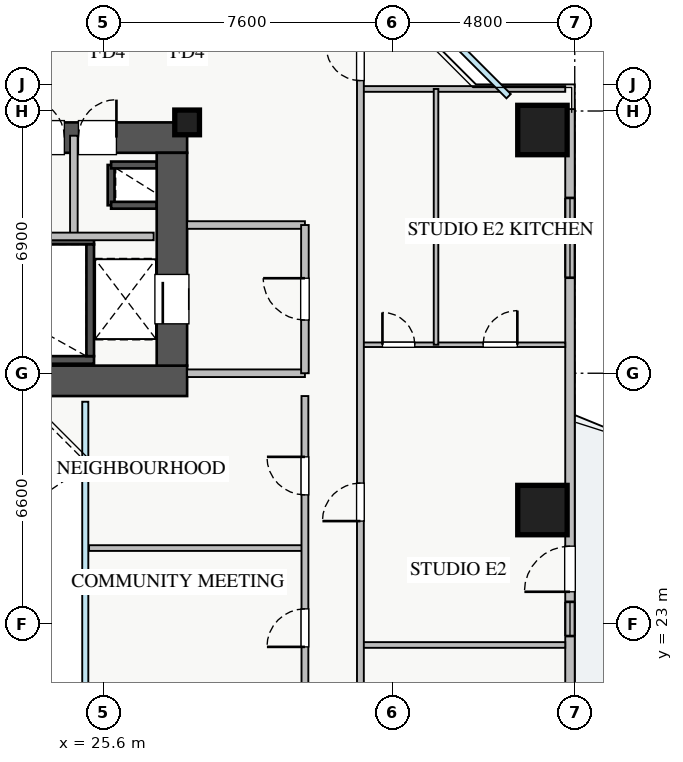
"""IFC4 building model, lengths in metres.
Left out: names, types, materials, properties, quantities, classifications, styles, units other than length and angle.
Written with IfcOpenShell. Run it as: python <this file> out.ifc"""

import sys

from ifc_helpers import new_model, si_unit, direction, frame, frame_2d, origin, origin_2d, place, context, subcontext, project, spatial, rectangle, extrude, source, transform, mapped, element, fill, save


model = new_model("IFC4")
c1 = context("Model", 3, precision=1e-05, world=origin(), true_north=direction((0.0, 1.0)))
c2 = subcontext(c1, "Body", "Model", "MODEL_VIEW")
j1 = project(units=[si_unit("LENGTHUNIT", "METRE"), si_unit("PLANEANGLEUNIT", "RADIAN")], contexts=[c1])
p1 = place(None, origin())
s1 = spatial("IfcSite", under=j1, at=p1, CompositionType="ELEMENT")
p2 = place(p1, origin())
s2 = spatial("IfcBuilding", under=s1, at=p2, CompositionType="ELEMENT")
p3 = place(p2, frame((0.0, 0.0, 60.0)))
s3 = spatial("IfcBuildingStorey", under=s2, at=p3, CompositionType="ELEMENT", Elevation=60.0)
p4 = place(p3, frame((25.8, 34.02, 0.0), z_axis=(0.0, 0.0, 1.0), x_axis=(0.0, 1.0, 0.0)))
e1 = element("IfcWall", 1, at=p4, inside=s3, PredefinedType="SHEAR", context=c2, shape_type="SweptSolid", body=[
    extrude(rectangle(XDim=1.06, YDim=0.18, at=frame_2d((0.53, 0.0))), origin(), (0.0, 0.0, 1.0), 3.07),
])
for number, where, z_axis, x_axis in (
    (2, (25.8, 35.08, 0.0), (0.0, 0.0, 1.0), (1.0, 0.0, 0.0)),
    (3, (25.8, 34.02, 0.0), (0.0, 0.0, 1.0), (1.0, 0.0, 0.0)),
):
    element("IfcWall", number, at=place(p3, frame(where, z_axis=z_axis, x_axis=x_axis)), inside=s3, PredefinedType="SHEAR", context=c2, shape_type="SweptSolid", body=[
        extrude(rectangle(XDim=1.2, YDim=0.18, at=frame_2d((0.6, 0.0))), origin(), (0.0, 0.0, 1.0), 3.07),
    ])
p5 = place(p3, frame((18.2, 29.95, 0.0), z_axis=(0.0, 0.0, 1.0), x_axis=(1.0, 0.0, 0.0)))
e4 = element("IfcWall", 4, at=p5, inside=s3, PredefinedType="SHEAR", context=c2, shape_type="SweptSolid", body=[
    extrude(rectangle(XDim=7.15, YDim=0.2, at=frame_2d((3.575, 0.0))), origin(), (0.0, 0.0, 1.0), 3.25),
])
p6 = place(p3, frame((18.2, 33.09, 0.0), z_axis=(0.0, 0.0, 1.0), x_axis=(1.0, 0.0, 0.0)))
e5 = element("IfcWall", 5, at=p6, inside=s3, PredefinedType="SHEAR", context=c2, shape_type="SweptSolid", body=[
    extrude(rectangle(XDim=7.15, YDim=0.2, at=frame_2d((3.575, 0.0))), origin(), (0.0, 0.0, 1.0), 3.25),
])
p7 = place(p6, frame((0.35, 0.0, 0.0)))
e6 = element("IfcOpeningElement", 6, at=p7, cuts=e5, PredefinedType="OPENING", context=c2, shape_type="SweptSolid", body=[
    extrude(rectangle(XDim=1.1, YDim=2.05, at=frame_2d((0.55, 1.025))), frame((0.0, 0.11, 0.0), z_axis=(0.0, -1.0, 0.0), x_axis=(1.0, 0.0, 0.0)), (0.0, 0.0, 1.0), 0.22),
])
p8 = place(p3, frame((25.25, 30.05, 0.0), z_axis=(0.0, 0.0, 1.0), x_axis=(0.0, 1.0, 0.0)))
e7 = element("IfcWall", 7, at=p8, inside=s3, PredefinedType="SHEAR", context=c2, shape_type="SweptSolid", body=[
    extrude(rectangle(XDim=2.94, YDim=0.2, at=frame_2d((1.47, 0.0))), origin(), (0.0, 0.0, 1.0), 3.25),
])
p9 = place(p3, frame((10.2, 29.4, 0.0), z_axis=(0.0, 0.0, 1.0), x_axis=(1.0, 0.0, 0.0)))
e8 = element("IfcWall", 8, at=p9, inside=s3, PredefinedType="SHEAR", context=c2, shape_type="SweptSolid", body=[
    extrude(rectangle(XDim=17.6, YDim=0.8, at=frame_2d((8.8, 0.0))), origin(), (0.0, 0.0, 1.0), 3.25),
])
p10 = place(p3, frame((10.2, 35.8, 0.0), z_axis=(0.0, 0.0, 1.0), x_axis=(1.0, 0.0, 0.0)))
e9 = element("IfcWall", 9, at=p10, inside=s3, PredefinedType="SHEAR", context=c2, shape_type="SweptSolid", body=[
    extrude(rectangle(XDim=17.6, YDim=0.8, at=frame_2d((8.8, 0.0))), origin(), (0.0, 0.0, 1.0), 3.25),
])
p11 = place(p10, frame((1.15, 0.0, 0.0)))
e10 = element("IfcOpeningElement", 10, at=p11, cuts=e9, PredefinedType="OPENING", context=c2, shape_type="SweptSolid", body=[
    extrude(rectangle(XDim=1.1, YDim=2.05, at=frame_2d((0.55, 1.025))), frame((0.0, 0.41, 0.0), z_axis=(0.0, -1.0, 0.0), x_axis=(1.0, 0.0, 0.0)), (0.0, 0.0, 1.0), 0.82),
])
p12 = place(p10, frame((8.3, 0.0, 0.0)))
e11 = element("IfcOpeningElement", 11, at=p12, cuts=e9, PredefinedType="OPENING", context=c2, shape_type="SweptSolid", body=[
    extrude(rectangle(XDim=1.1, YDim=2.05, at=frame_2d((0.55, 1.025))), frame((0.0, 0.41, 0.0), z_axis=(0.0, -1.0, 0.0), x_axis=(1.0, 0.0, 0.0)), (0.0, 0.0, 1.0), 0.82),
])
p13 = place(p10, frame((10.05, 0.0, 0.0)))
e12 = element("IfcOpeningElement", 12, at=p13, cuts=e9, PredefinedType="OPENING", context=c2, shape_type="SweptSolid", body=[
    extrude(rectangle(XDim=1.1, YDim=2.05, at=frame_2d((0.55, 1.025))), frame((0.0, 0.41, 0.0), z_axis=(0.0, -1.0, 0.0), x_axis=(1.0, 0.0, 0.0)), (0.0, 0.0, 1.0), 0.82),
])
p14 = place(p10, frame((14.74, 0.0, 0.0)))
e13 = element("IfcOpeningElement", 13, at=p14, cuts=e9, PredefinedType="OPENING", context=c2, shape_type="SweptSolid", body=[
    extrude(rectangle(XDim=1.0, YDim=2.05, at=frame_2d((0.5, 1.025))), frame((0.0, 0.41, 0.0), z_axis=(0.0, -1.0, 0.0), x_axis=(1.0, 0.0, 0.0)), (0.0, 0.0, 1.0), 0.82),
])
p15 = place(p10, frame((11.835, 0.0, 0.0)))
e14 = element("IfcOpeningElement", 14, at=p15, cuts=e9, PredefinedType="OPENING", context=c2, shape_type="SweptSolid", body=[
    extrude(rectangle(XDim=1.0, YDim=2.05, at=frame_2d((0.5, 1.025))), frame((0.0, 0.41, 0.0), z_axis=(0.0, -1.0, 0.0), x_axis=(1.0, 0.0, 0.0)), (0.0, 0.0, 1.0), 0.82),
])
p16 = place(p10, frame((13.37, 0.0, 0.0)))
e15 = element("IfcOpeningElement", 15, at=p16, cuts=e9, PredefinedType="OPENING", context=c2, shape_type="SweptSolid", body=[
    extrude(rectangle(XDim=1.0, YDim=2.05, at=frame_2d((0.5, 1.025))), frame((0.0, 0.41, 0.0), z_axis=(0.0, -1.0, 0.0), x_axis=(1.0, 0.0, 0.0)), (0.0, 0.0, 1.0), 0.82),
])
p17 = place(p3, frame((27.4, 29.8, 0.0), z_axis=(0.0, 0.0, 1.0), x_axis=(0.0, 1.0, 0.0)))
e16 = element("IfcWall", 16, at=p17, inside=s3, PredefinedType="SHEAR", context=c2, shape_type="SweptSolid", body=[
    extrude(rectangle(XDim=5.6, YDim=0.8, at=frame_2d((2.8, 0.0))), origin(), (0.0, 0.0, 1.0), 3.25),
])
p18 = place(p17, frame((1.1, 0.0, 0.0)))
e17 = element("IfcOpeningElement", 17, at=p18, cuts=e16, PredefinedType="OPENING", context=c2, shape_type="SweptSolid", body=[
    extrude(rectangle(XDim=1.3, YDim=2.05, at=frame_2d((0.65, 1.025))), frame((0.0, 0.41, 0.0), z_axis=(0.0, -1.0, 0.0), x_axis=(1.0, 0.0, 0.0)), (0.0, 0.0, 1.0), 0.82),
])
m1 = source(origin(), c2, "Body", "SweptSolid", [
    extrude(rectangle(XDim=0.65, YDim=0.65, at=origin_2d()), origin(), (0.0, 0.0, 1.0), 3.25),
])
p19 = place(p3, frame((27.8, 36.2, 0.0), z_axis=(0.0, 0.0, 1.0), x_axis=(1.0, 0.0, 0.0)))
e18 = element("IfcColumn", 18, at=p19, inside=s3, PredefinedType="PILASTER", context=c2, shape_type="MappedRepresentation", body=[
    mapped(m1, transform((0.0, 0.0, 0.0), x_axis=(1.0, 0.0, 0.0), y_axis=(0.0, 1.0, 0.0), z_axis=(0.0, 0.0, 1.0), scale=1.0)),
])
m2 = source(origin(), c2, "Body", "SweptSolid", [
    extrude(rectangle(XDim=1.3, YDim=1.3, at=origin_2d()), origin(), (0.0, 0.0, 1.0), 3.25),
])
for number, where, z_axis, x_axis in (
    (19, (37.15, 26.0, 0.0), (0.0, 0.0, 1.0), (1.0, 0.0, 0.0)),
    (20, (37.15, 36.0, 0.0), (0.0, 0.0, 1.0), (1.0, 0.0, 0.0)),
):
    element("IfcColumn", number, at=place(p3, frame(where, z_axis=z_axis, x_axis=x_axis)), inside=s3, PredefinedType="COLUMN", context=c2, shape_type="MappedRepresentation", body=[
        mapped(m2, transform((0.0, 0.0, 0.0), x_axis=(1.0, 0.0, 0.0), y_axis=(0.0, 1.0, 0.0), z_axis=(0.0, 0.0, 1.0), scale=1.0)),
    ])
p20 = place(p3, frame((37.875, 9.45, 0.0), z_axis=(0.0, 0.0, 1.0), x_axis=(0.0, 1.0, 0.0)))
e21 = element("IfcWall", 21, at=p20, inside=s3, PredefinedType="STANDARD", context=c2, shape_type="SweptSolid", body=[
    extrude(rectangle(XDim=27.1, YDim=0.25, at=frame_2d((13.55, 0.0))), origin(), (0.0, 0.0, 1.0), 2.61),
])
p21 = place(p20, frame((14.4, 0.0, 0.0)))
e22 = element("IfcOpeningElement", 22, at=p21, cuts=e21, PredefinedType="OPENING", context=c2, shape_type="SweptSolid", body=[
    extrude(rectangle(XDim=1.2, YDim=2.1, at=frame_2d((0.6, 1.05))), frame((0.0, 0.135, 0.0), z_axis=(0.0, -1.0, 0.0), x_axis=(1.0, 0.0, 0.0)), (0.0, 0.0, 1.0), 0.27),
])
p22 = place(p20, frame((2.188, 0.0, 0.9)))
e23 = element("IfcOpeningElement", 23, at=p22, cuts=e21, PredefinedType="OPENING", context=c2, shape_type="SweptSolid", body=[
    extrude(rectangle(XDim=2.4, YDim=1.48, at=frame_2d((1.2, 0.74))), frame((0.0, 0.135, 0.0), z_axis=(0.0, -1.0, 0.0), x_axis=(1.0, 0.0, 0.0)), (0.0, 0.0, 1.0), 0.27),
])
p23 = place(p20, frame((22.663, 0.0, 0.9)))
e24 = element("IfcOpeningElement", 24, at=p23, cuts=e21, PredefinedType="OPENING", context=c2, shape_type="SweptSolid", body=[
    extrude(rectangle(XDim=2.1, YDim=1.48, at=frame_2d((1.05, 0.74))), frame((0.0, 0.135, 0.0), z_axis=(0.0, -1.0, 0.0), x_axis=(1.0, 0.0, 0.0)), (0.0, 0.0, 1.0), 0.27),
])
p24 = place(p20, frame((13.235, 0.0, 0.9)))
e25 = element("IfcOpeningElement", 25, at=p24, cuts=e21, PredefinedType="OPENING", context=c2, shape_type="SweptSolid", body=[
    extrude(rectangle(XDim=0.9, YDim=1.2, at=frame_2d((0.45, 0.6))), frame((0.0, 0.135, 0.0), z_axis=(0.0, -1.0, 0.0), x_axis=(1.0, 0.0, 0.0)), (0.0, 0.0, 1.0), 0.27),
])
for number, where, z_axis, x_axis in (
    (26, (27.8, 29.6, 0.0), (0.0, 0.0, 1.0), (1.0, 0.0, 0.0)),
    (27, (27.8, 33.5, 0.0), (0.0, 0.0, 1.0), (1.0, 0.0, 0.0)),
):
    element("IfcWall", number, at=place(p3, frame(where, z_axis=z_axis, x_axis=x_axis)), inside=s3, PredefinedType="PARTITIONING", context=c2, shape_type="SweptSolid", body=[
        extrude(rectangle(XDim=3.1, YDim=0.2, at=frame_2d((1.55, 0.0))), origin(), (0.0, 0.0, 1.0), 3.07),
    ])
p25 = place(p3, frame((30.9, 29.6, 0.0), z_axis=(0.0, 0.0, 1.0), x_axis=(0.0, 1.0, 0.0)))
e28 = element("IfcWall", 28, at=p25, inside=s3, PredefinedType="PARTITIONING", context=c2, shape_type="SweptSolid", body=[
    extrude(rectangle(XDim=3.9, YDim=0.2, at=frame_2d((1.95, 0.0))), origin(), (0.0, 0.0, 1.0), 3.07),
])
p26 = place(p25, frame((1.4, 0.0, 0.0)))
e29 = element("IfcOpeningElement", 29, at=p26, cuts=e28, PredefinedType="OPENING", context=c2, shape_type="SweptSolid", body=[
    extrude(rectangle(XDim=1.1, YDim=2.05, at=frame_2d((0.55, 1.025))), frame((0.0, 0.11, 0.0), z_axis=(0.0, -1.0, 0.0), x_axis=(1.0, 0.0, 0.0)), (0.0, 0.0, 1.0), 0.22),
])
p27 = place(p3, frame((24.82, 33.2, 0.0), z_axis=(0.0, 0.0, 1.0), x_axis=(0.0, 1.0, 0.0)))
e30 = element("IfcWall", 30, at=p27, inside=s3, PredefinedType="PARTITIONING", context=c2, shape_type="SweptSolid", body=[
    extrude(rectangle(XDim=2.65, YDim=0.2, at=frame_2d((1.325, 0.0))), origin(), (0.0, 0.0, 1.0), 3.07),
])
p28 = place(p3, frame((21.75, 33.2, 0.0), z_axis=(0.0, 0.0, 1.0), x_axis=(1.0, 0.0, 0.0)))
e31 = element("IfcWall", 31, at=p28, inside=s3, PredefinedType="PARTITIONING", context=c2, shape_type="SweptSolid", body=[
    extrude(rectangle(XDim=5.17, YDim=0.2, at=frame_2d((2.585, 0.0))), origin(), (0.0, 0.0, 1.0), 3.07),
])
p29 = place(p3, frame((32.36, 37.08, 0.0), z_axis=(0.0, 0.0, 1.0), x_axis=(1.0, 0.0, 0.0)))
e32 = element("IfcWall", 32, at=p29, inside=s3, PredefinedType="PARTITIONING", context=c2, shape_type="SweptSolid", body=[
    extrude(rectangle(XDim=5.39, YDim=0.15, at=frame_2d((2.695, 0.0))), origin(), (0.0, 0.0, 1.0), 3.07),
])
p30 = place(p3, frame((32.36, 30.35, 0.0), z_axis=(0.0, 0.0, 1.0), x_axis=(1.0, 0.0, 0.0)))
e33 = element("IfcWall", 33, at=p30, inside=s3, PredefinedType="PLUMBINGWALL", context=c2, shape_type="SweptSolid", body=[
    extrude(rectangle(XDim=5.39, YDim=0.12, at=frame_2d((2.695, 0.0))), origin(), (0.0, 0.0, 1.0), 3.07),
])
p31 = place(p30, frame((0.58, 0.0, 0.0)))
e34 = element("IfcOpeningElement", 34, at=p31, cuts=e33, PredefinedType="OPENING", context=c2, shape_type="SweptSolid", body=[
    extrude(rectangle(XDim=0.85, YDim=2.05, at=frame_2d((0.425, 1.025))), frame((0.0, 0.07, 0.0), z_axis=(0.0, -1.0, 0.0), x_axis=(1.0, 0.0, 0.0)), (0.0, 0.0, 1.0), 0.14),
])
p32 = place(p30, frame((3.23, 0.0, 0.0)))
e35 = element("IfcOpeningElement", 35, at=p32, cuts=e33, PredefinedType="OPENING", context=c2, shape_type="SweptSolid", body=[
    extrude(rectangle(XDim=0.9, YDim=2.05, at=frame_2d((0.45, 1.025))), frame((0.0, 0.07, 0.0), z_axis=(0.0, -1.0, 0.0), x_axis=(1.0, 0.0, 0.0)), (0.0, 0.0, 1.0), 0.14),
])
p33 = place(p3, frame((34.35, 30.35, 0.0), z_axis=(0.0, 0.0, 1.0), x_axis=(0.0, 1.0, 0.0)))
e36 = element("IfcWall", 36, at=p33, inside=s3, PredefinedType="PLUMBINGWALL", context=c2, shape_type="SweptSolid", body=[
    extrude(rectangle(XDim=6.73, YDim=0.12, at=frame_2d((3.365, 0.0))), origin(), (0.0, 0.0, 1.0), 3.07),
])
p34 = place(p3, frame((32.36, 22.45, 0.0), z_axis=(0.0, 0.0, 1.0), x_axis=(1.0, 0.0, 0.0)))
e37 = element("IfcWall", 37, at=p34, inside=s3, PredefinedType="PARTITIONING", context=c2, shape_type="SweptSolid", body=[
    extrude(rectangle(XDim=5.39, YDim=0.15, at=frame_2d((2.695, 0.0))), origin(), (0.0, 0.0, 1.0), 3.07),
])
p35 = place(p3, frame((32.36, 7.21, 0.0), z_axis=(0.0, 0.0, 1.0), x_axis=(0.0, 1.0, 0.0)))
e38 = element("IfcWall", 38, at=p35, inside=s3, PredefinedType="PARTITIONING", context=c2, shape_type="SweptSolid", body=[
    extrude(rectangle(XDim=31.23, YDim=0.18, at=frame_2d((15.615, 0.0))), origin(), (0.0, 0.0, 1.0), 2.821),
])
p36 = place(p35, frame((30.09, 0.0, 0.0)))
e39 = element("IfcOpeningElement", 39, at=p36, cuts=e38, PredefinedType="OPENING", context=c2, shape_type="SweptSolid", body=[
    extrude(rectangle(XDim=0.9, YDim=2.05, at=frame_2d((0.45, 1.025))), frame((0.0, 0.1, 0.0), z_axis=(0.0, -1.0, 0.0), x_axis=(1.0, 0.0, 0.0)), (0.0, 0.0, 1.0), 0.2),
])
p37 = place(p35, frame((0.415, 0.0, 0.0)))
e40 = element("IfcOpeningElement", 40, at=p37, cuts=e38, PredefinedType="OPENING", context=c2, shape_type="SweptSolid", body=[
    extrude(rectangle(XDim=0.9, YDim=2.05, at=frame_2d((0.45, 1.025))), frame((0.0, 0.1, 0.0), z_axis=(0.0, -1.0, 0.0), x_axis=(1.0, 0.0, 0.0)), (0.0, 0.0, 1.0), 0.2),
])
p38 = place(p35, frame((7.975, 0.0, 0.0)))
e41 = element("IfcOpeningElement", 41, at=p38, cuts=e38, PredefinedType="OPENING", context=c2, shape_type="SweptSolid", body=[
    extrude(rectangle(XDim=1.0, YDim=2.05, at=frame_2d((0.5, 1.025))), frame((0.0, 0.1, 0.0), z_axis=(0.0, -1.0, 0.0), x_axis=(1.0, 0.0, 0.0)), (0.0, 0.0, 1.0), 0.2),
])
p39 = place(p35, frame((18.5, 0.0, 0.0)))
e42 = element("IfcOpeningElement", 42, at=p39, cuts=e38, PredefinedType="OPENING", context=c2, shape_type="SweptSolid", body=[
    extrude(rectangle(XDim=1.0, YDim=2.05, at=frame_2d((0.5, 1.025))), frame((0.0, 0.1, 0.0), z_axis=(0.0, -1.0, 0.0), x_axis=(1.0, 0.0, 0.0)), (0.0, 0.0, 1.0), 0.2),
])
p40 = place(p3, frame((25.22, 25.0, 0.0), z_axis=(0.0, 0.0, 1.0), x_axis=(1.0, 0.0, 0.0)))
e43 = element("IfcWall", 43, at=p40, inside=s3, PredefinedType="PARTITIONING", context=c2, shape_type="SweptSolid", body=[
    extrude(rectangle(XDim=5.68, YDim=0.15, at=frame_2d((2.84, 0.0))), origin(), (0.0, 0.0, 1.0), 3.07),
])
p41 = place(p3, frame((30.9, 17.0, 0.0), z_axis=(0.0, 0.0, 1.0), x_axis=(0.0, 1.0, 0.0)))
e44 = element("IfcWall", 44, at=p41, inside=s3, PredefinedType="PARTITIONING", context=c2, shape_type="SweptSolid", body=[
    extrude(rectangle(XDim=12.0, YDim=0.18, at=frame_2d((6.0, 0.0))), origin(), (0.0, 0.0, 1.0), 3.07),
])
p42 = place(p41, frame((1.4, 0.0, 0.0)))
e45 = element("IfcOpeningElement", 45, at=p42, cuts=e44, PredefinedType="OPENING", context=c2, shape_type="SweptSolid", body=[
    extrude(rectangle(XDim=1.0, YDim=2.05, at=frame_2d((0.5, 1.025))), frame((0.0, 0.1, 0.0), z_axis=(0.0, -1.0, 0.0), x_axis=(1.0, 0.0, 0.0)), (0.0, 0.0, 1.0), 0.2),
])
p43 = place(p41, frame((5.4, 0.0, 0.0)))
e46 = element("IfcOpeningElement", 46, at=p43, cuts=e44, PredefinedType="OPENING", context=c2, shape_type="SweptSolid", body=[
    extrude(rectangle(XDim=1.0, YDim=2.05, at=frame_2d((0.5, 1.025))), frame((0.0, 0.1, 0.0), z_axis=(0.0, -1.0, 0.0), x_axis=(1.0, 0.0, 0.0)), (0.0, 0.0, 1.0), 0.2),
])
p44 = place(p41, frame((9.4, 0.0, 0.0)))
e47 = element("IfcOpeningElement", 47, at=p44, cuts=e44, PredefinedType="OPENING", context=c2, shape_type="SweptSolid", body=[
    extrude(rectangle(XDim=1.0, YDim=2.05, at=frame_2d((0.5, 1.025))), frame((0.0, 0.1, 0.0), z_axis=(0.0, -1.0, 0.0), x_axis=(1.0, 0.0, 0.0)), (0.0, 0.0, 1.0), 0.2),
])
m3 = source(origin(), c2, "Body", "SweptSolid", [
    extrude(rectangle(XDim=1.2, YDim=2.1, at=frame_2d((0.6, 1.05))), frame((0.0, 0.025, 0.0), z_axis=(0.0, -1.0, 0.0), x_axis=(1.0, 0.0, 0.0)), (0.0, 0.0, 1.0), 0.05),
])
p45 = place(p21, origin())
e48 = element("IfcDoor", 48, at=p45, inside=s3, OperationType="SINGLE_SWING_LEFT", PredefinedType="DOOR", context=c2, shape_type="MappedRepresentation", body=[
    mapped(m3, transform((0.0, 0.0, 0.0), x_axis=(1.0, 0.0, 0.0), y_axis=(0.0, 1.0, 0.0), z_axis=(0.0, 0.0, 1.0), scale=1.0)),
])
fill(e22, e48)
m4 = source(origin(), c2, "Body", "SweptSolid", [
    extrude(rectangle(XDim=2.1, YDim=1.48, at=frame_2d((1.05, 0.74))), frame((0.0, 0.03, 0.0), z_axis=(0.0, -1.0, 0.0), x_axis=(1.0, 0.0, 0.0)), (0.0, 0.0, 1.0), 0.06),
])
p46 = place(p23, origin())
e49 = element("IfcWindow", 49, at=p46, inside=s3, PartitioningType="TRIPLE_PANEL_VERTICAL", PredefinedType="WINDOW", context=c2, shape_type="MappedRepresentation", body=[
    mapped(m4, transform((0.0, 0.0, 0.0), x_axis=(1.0, 0.0, 0.0), y_axis=(0.0, 1.0, 0.0), z_axis=(0.0, 0.0, 1.0), scale=1.0)),
])
fill(e24, e49)
m5 = source(origin(), c2, "Body", "SweptSolid", [
    extrude(rectangle(XDim=1.3, YDim=2.05, at=frame_2d((0.65, 1.025))), frame((0.0, 0.025, 0.0), z_axis=(0.0, -1.0, 0.0), x_axis=(1.0, 0.0, 0.0)), (0.0, 0.0, 1.0), 0.05),
])
p47 = place(p18, origin())
e50 = element("IfcDoor", 50, at=p47, inside=s3, OperationType="SLIDING_TO_LEFT", PredefinedType="DOOR", context=c2, shape_type="MappedRepresentation", body=[
    mapped(m5, transform((0.0, 0.0, 0.0), x_axis=(1.0, 0.0, 0.0), y_axis=(0.0, 1.0, 0.0), z_axis=(0.0, 0.0, 1.0), scale=1.0)),
])
fill(e17, e50)
m6 = source(origin(), c2, "Body", "SweptSolid", [
    extrude(rectangle(XDim=1.0, YDim=2.05, at=frame_2d((0.5, 1.025))), frame((0.0, 0.025, 0.0), z_axis=(0.0, -1.0, 0.0), x_axis=(1.0, 0.0, 0.0)), (0.0, 0.0, 1.0), 0.05),
])
p48 = place(p14, origin())
e51 = element("IfcDoor", 51, at=p48, inside=s3, OperationType="SINGLE_SWING_RIGHT", PredefinedType="DOOR", context=c2, shape_type="MappedRepresentation", body=[
    mapped(m6, transform((0.0, 0.0, 0.0), x_axis=(1.0, 0.0, 0.0), y_axis=(0.0, 1.0, 0.0), z_axis=(0.0, 0.0, 1.0), scale=1.0)),
])
fill(e13, e51)
p49 = place(p16, origin())
e52 = element("IfcDoor", 52, at=p49, inside=s3, OperationType="SINGLE_SWING_LEFT", PredefinedType="DOOR", context=c2, shape_type="MappedRepresentation", body=[
    mapped(m6, transform((0.0, 0.0, 0.0), x_axis=(1.0, 0.0, 0.0), y_axis=(0.0, 1.0, 0.0), z_axis=(0.0, 0.0, 1.0), scale=1.0)),
])
fill(e15, e52)
m7 = source(origin(), c2, "Body", "SweptSolid", [
    extrude(rectangle(XDim=1.1, YDim=2.05, at=frame_2d((0.55, 1.025))), frame((0.0, 0.025, 0.0), z_axis=(0.0, -1.0, 0.0), x_axis=(1.0, 0.0, 0.0)), (0.0, 0.0, 1.0), 0.05),
])
p50 = place(p26, origin())
e53 = element("IfcDoor", 53, at=p50, inside=s3, OperationType="SINGLE_SWING_RIGHT", PredefinedType="DOOR", context=c2, shape_type="MappedRepresentation", body=[
    mapped(m7, transform((0.0, 0.0, 0.0), x_axis=(1.0, 0.0, 0.0), y_axis=(0.0, 1.0, 0.0), z_axis=(0.0, 0.0, 1.0), scale=1.0)),
])
fill(e29, e53)
m8 = source(origin(), c2, "Body", "SweptSolid", [
    extrude(rectangle(XDim=0.85, YDim=2.05, at=frame_2d((0.425, 1.025))), frame((0.0, 0.025, 0.0), z_axis=(0.0, -1.0, 0.0), x_axis=(1.0, 0.0, 0.0)), (0.0, 0.0, 1.0), 0.05),
])
p51 = place(p31, origin())
e54 = element("IfcDoor", 54, at=p51, inside=s3, OperationType="SINGLE_SWING_LEFT", PredefinedType="DOOR", context=c2, shape_type="MappedRepresentation", body=[
    mapped(m8, transform((0.0, 0.0, 0.0), x_axis=(1.0, 0.0, 0.0), y_axis=(0.0, 1.0, 0.0), z_axis=(0.0, 0.0, 1.0), scale=1.0)),
])
fill(e34, e54)
m9 = source(origin(), c2, "Body", "SweptSolid", [
    extrude(rectangle(XDim=0.9, YDim=2.05, at=frame_2d((0.45, 1.025))), frame((0.0, 0.025, 0.0), z_axis=(0.0, -1.0, 0.0), x_axis=(1.0, 0.0, 0.0)), (0.0, 0.0, 1.0), 0.05),
])
p52 = place(p32, origin())
e55 = element("IfcDoor", 55, at=p52, inside=s3, OperationType="SINGLE_SWING_RIGHT", PredefinedType="DOOR", context=c2, shape_type="MappedRepresentation", body=[
    mapped(m9, transform((0.0, 0.0, 0.0), x_axis=(1.0, 0.0, 0.0), y_axis=(0.0, 1.0, 0.0), z_axis=(0.0, 0.0, 1.0), scale=1.0)),
])
fill(e35, e55)
p53 = place(p36, origin())
e56 = element("IfcDoor", 56, at=p53, inside=s3, OperationType="SINGLE_SWING_RIGHT", PredefinedType="DOOR", context=c2, shape_type="MappedRepresentation", body=[
    mapped(m9, transform((0.0, 0.0, 0.0), x_axis=(1.0, 0.0, 0.0), y_axis=(0.0, 1.0, 0.0), z_axis=(0.0, 0.0, 1.0), scale=1.0)),
])
fill(e39, e56)
p54 = place(p39, origin())
e57 = element("IfcDoor", 57, at=p54, inside=s3, OperationType="SINGLE_SWING_LEFT", PredefinedType="DOOR", context=c2, shape_type="MappedRepresentation", body=[
    mapped(m6, transform((0.0, 0.0, 0.0), x_axis=(1.0, 0.0, 0.0), y_axis=(0.0, 1.0, 0.0), z_axis=(0.0, 0.0, 1.0), scale=1.0)),
])
fill(e42, e57)
p55 = place(p43, origin())
e58 = element("IfcDoor", 58, at=p55, inside=s3, OperationType="SINGLE_SWING_LEFT", PredefinedType="DOOR", context=c2, shape_type="MappedRepresentation", body=[
    mapped(m6, transform((0.0, 0.0, 0.0), x_axis=(1.0, 0.0, 0.0), y_axis=(0.0, 1.0, 0.0), z_axis=(0.0, 0.0, 1.0), scale=1.0)),
])
fill(e46, e58)
p56 = place(p44, origin())
e59 = element("IfcDoor", 59, at=p56, inside=s3, OperationType="SINGLE_SWING_RIGHT", PredefinedType="DOOR", context=c2, shape_type="MappedRepresentation", body=[
    mapped(m6, transform((0.0, 0.0, 0.0), x_axis=(1.0, 0.0, 0.0), y_axis=(0.0, 1.0, 0.0), z_axis=(0.0, 0.0, 1.0), scale=1.0)),
])
fill(e47, e59)
m10 = source(origin(), c2, "Body", "SweptSolid", [
    extrude(rectangle(XDim=0.9, YDim=1.2, at=frame_2d((0.45, 0.6))), frame((0.0, 0.03, 0.0), z_axis=(0.0, -1.0, 0.0), x_axis=(1.0, 0.0, 0.0)), (0.0, 0.0, 1.0), 0.06),
])
p57 = place(p24, origin())
e60 = element("IfcWindow", 60, at=p57, inside=s3, PartitioningType="SINGLE_PANEL", PredefinedType="WINDOW", context=c2, shape_type="MappedRepresentation", body=[
    mapped(m10, transform((0.0, 0.0, 0.0), x_axis=(1.0, 0.0, 0.0), y_axis=(0.0, 1.0, 0.0), z_axis=(0.0, 0.0, 1.0), scale=1.0)),
])
fill(e25, e60)
save(model, sys.argv[1])
